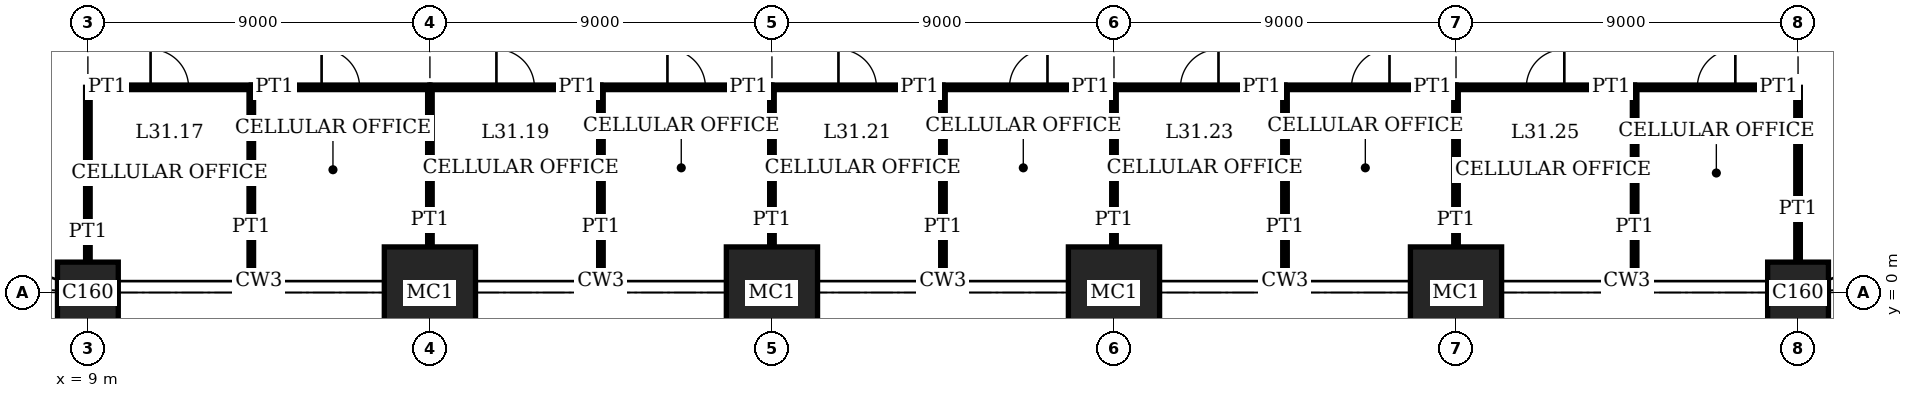
"""IFC4 building model, lengths in metres.
Left out: names, types, materials, properties, quantities, classifications, styles, units other than length and angle.
Written with IfcOpenShell. Run it as: python <this file> out.ifc"""

import sys

from ifc_helpers import new_model, si_unit, direction, frame, frame_2d, origin, origin_2d, place, context, subcontext, project, spatial, rectangle, extrude, element, fill, save


model = new_model("IFC4")
c1 = context("Model", 3, precision=1e-05, world=origin(), true_north=direction((0.0, 1.0)))
c2 = subcontext(c1, "Body", "Model", "MODEL_VIEW")
j1 = project(units=[si_unit("LENGTHUNIT", "METRE"), si_unit("PLANEANGLEUNIT", "RADIAN")], contexts=[c1])
p1 = place(None, origin())
s1 = spatial("IfcSite", under=j1, at=p1, CompositionType="ELEMENT")
p2 = place(p1, origin())
s2 = spatial("IfcBuilding", under=s1, at=p2, CompositionType="ELEMENT")
p3 = place(p2, frame((0.0, 0.0, 129.0)))
s3 = spatial("IfcBuildingStorey", under=s2, at=p3, CompositionType="ELEMENT", Elevation=129.0)
p4 = place(p3, frame((9.0, 0.0, 0.0), z_axis=(0.0, 0.0, 1.0), x_axis=(1.0, 0.0, 0.0)))
e1 = element("IfcColumn", 1, at=p4, inside=s3, PredefinedType="COLUMN", context=c2, shape_type="SweptSolid", body=[
    extrude(rectangle(XDim=1.6, YDim=1.6, at=origin_2d()), origin(), (0.0, 0.0, 1.0), 4.0),
])
for number, where, z_axis, x_axis in (
    (2, (18.0, 0.0, 0.0), (0.0, 0.0, 1.0), (1.0, 0.0, 0.0)),
    (3, (27.0, 0.0, 0.0), (0.0, 0.0, 1.0), (1.0, 0.0, 0.0)),
    (4, (36.0, 0.0, 0.0), (0.0, 0.0, 1.0), (1.0, 0.0, 0.0)),
    (5, (45.0, 0.0, 0.0), (0.0, 0.0, 1.0), (1.0, 0.0, 0.0)),
):
    element("IfcColumn", number, at=place(p3, frame(where, z_axis=z_axis, x_axis=x_axis)), inside=s3, PredefinedType="COLUMN", context=c2, shape_type="SweptSolid", body=[
        extrude(rectangle(XDim=2.4, YDim=2.4, at=origin_2d()), origin(), (0.0, 0.0, 1.0), 4.0),
    ])
p5 = place(p3, frame((54.0, 0.0, 0.0), z_axis=(0.0, 0.0, 1.0), x_axis=(1.0, 0.0, 0.0)))
e6 = element("IfcColumn", 6, at=p5, inside=s3, PredefinedType="COLUMN", context=c2, shape_type="SweptSolid", body=[
    extrude(rectangle(XDim=1.6, YDim=1.6, at=origin_2d()), origin(), (0.0, 0.0, 1.0), 4.0),
])
p6 = place(p3, frame((9.0, 5.4, 0.0), z_axis=(0.0, 0.0, 1.0), x_axis=(1.0, 0.0, 0.0)))
e7 = element("IfcWall", 7, at=p6, inside=s3, PredefinedType="PARTITIONING", context=c2, shape_type="SweptSolid", body=[
    extrude(rectangle(XDim=4.3, YDim=0.12, at=frame_2d((2.15, 0.0))), origin(), (0.0, 0.0, 1.0), 3.75),
])
p7 = place(p6, frame((1.65, 0.0, 0.0)))
e8 = element("IfcOpeningElement", 8, at=p7, cuts=e7, PredefinedType="OPENING", context=c2, shape_type="SweptSolid", body=[
    extrude(rectangle(XDim=1.0, YDim=2.4, at=frame_2d((0.5, 1.2))), frame((0.0, 0.07, 0.0), z_axis=(0.0, -1.0, 0.0), x_axis=(1.0, 0.0, 0.0)), (0.0, 0.0, 1.0), 0.14),
])
p8 = place(p3, frame((13.3, 5.4, 0.0), z_axis=(0.0, 0.0, 1.0), x_axis=(1.0, 0.0, 0.0)))
e9 = element("IfcWall", 9, at=p8, inside=s3, PredefinedType="PARTITIONING", context=c2, shape_type="SweptSolid", body=[
    extrude(rectangle(XDim=4.7, YDim=0.12, at=frame_2d((2.35, 0.0))), origin(), (0.0, 0.0, 1.0), 3.75),
])
p9 = place(p8, frame((1.85, 0.0, 0.0)))
e10 = element("IfcOpeningElement", 10, at=p9, cuts=e9, PredefinedType="OPENING", context=c2, shape_type="SweptSolid", body=[
    extrude(rectangle(XDim=1.0, YDim=2.4, at=frame_2d((0.5, 1.2))), frame((0.0, 0.07, 0.0), z_axis=(0.0, -1.0, 0.0), x_axis=(1.0, 0.0, 0.0)), (0.0, 0.0, 1.0), 0.14),
])
p10 = place(p3, frame((18.0, 5.4, 0.0), z_axis=(0.0, 0.0, 1.0), x_axis=(1.0, 0.0, 0.0)))
e11 = element("IfcWall", 11, at=p10, inside=s3, PredefinedType="PARTITIONING", context=c2, shape_type="SweptSolid", body=[
    extrude(rectangle(XDim=4.5, YDim=0.12, at=frame_2d((2.25, 0.0))), origin(), (0.0, 0.0, 1.0), 3.75),
])
p11 = place(p10, frame((1.75, 0.0, 0.0)))
e12 = element("IfcOpeningElement", 12, at=p11, cuts=e11, PredefinedType="OPENING", context=c2, shape_type="SweptSolid", body=[
    extrude(rectangle(XDim=1.0, YDim=2.4, at=frame_2d((0.5, 1.2))), frame((0.0, 0.07, 0.0), z_axis=(0.0, -1.0, 0.0), x_axis=(1.0, 0.0, 0.0)), (0.0, 0.0, 1.0), 0.14),
])
p12 = place(p3, frame((22.5, 5.4, 0.0), z_axis=(0.0, 0.0, 1.0), x_axis=(1.0, 0.0, 0.0)))
e13 = element("IfcWall", 13, at=p12, inside=s3, PredefinedType="PARTITIONING", context=c2, shape_type="SweptSolid", body=[
    extrude(rectangle(XDim=4.5, YDim=0.12, at=frame_2d((2.25, 0.0))), origin(), (0.0, 0.0, 1.0), 3.75),
])
p13 = place(p12, frame((1.75, 0.0, 0.0)))
e14 = element("IfcOpeningElement", 14, at=p13, cuts=e13, PredefinedType="OPENING", context=c2, shape_type="SweptSolid", body=[
    extrude(rectangle(XDim=1.0, YDim=2.4, at=frame_2d((0.5, 1.2))), frame((0.0, 0.07, 0.0), z_axis=(0.0, -1.0, 0.0), x_axis=(1.0, 0.0, 0.0)), (0.0, 0.0, 1.0), 0.14),
])
p14 = place(p3, frame((27.0, 5.4, 0.0), z_axis=(0.0, 0.0, 1.0), x_axis=(1.0, 0.0, 0.0)))
e15 = element("IfcWall", 15, at=p14, inside=s3, PredefinedType="PARTITIONING", context=c2, shape_type="SweptSolid", body=[
    extrude(rectangle(XDim=4.5, YDim=0.12, at=frame_2d((2.25, 0.0))), origin(), (0.0, 0.0, 1.0), 3.75),
])
p15 = place(p14, frame((1.75, 0.0, 0.0)))
e16 = element("IfcOpeningElement", 16, at=p15, cuts=e15, PredefinedType="OPENING", context=c2, shape_type="SweptSolid", body=[
    extrude(rectangle(XDim=1.0, YDim=2.4, at=frame_2d((0.5, 1.2))), frame((0.0, 0.07, 0.0), z_axis=(0.0, -1.0, 0.0), x_axis=(1.0, 0.0, 0.0)), (0.0, 0.0, 1.0), 0.14),
])
p16 = place(p3, frame((31.5, 5.4, 0.0), z_axis=(0.0, 0.0, 1.0), x_axis=(1.0, 0.0, 0.0)))
e17 = element("IfcWall", 17, at=p16, inside=s3, PredefinedType="PARTITIONING", context=c2, shape_type="SweptSolid", body=[
    extrude(rectangle(XDim=4.5, YDim=0.12, at=frame_2d((2.25, 0.0))), origin(), (0.0, 0.0, 1.0), 3.75),
])
p17 = place(p16, frame((1.75, 0.0, 0.0)))
e18 = element("IfcOpeningElement", 18, at=p17, cuts=e17, PredefinedType="OPENING", context=c2, shape_type="SweptSolid", body=[
    extrude(rectangle(XDim=1.0, YDim=2.4, at=frame_2d((0.5, 1.2))), frame((0.0, 0.07, 0.0), z_axis=(0.0, -1.0, 0.0), x_axis=(1.0, 0.0, 0.0)), (0.0, 0.0, 1.0), 0.14),
])
p18 = place(p3, frame((36.0, 5.4, 0.0), z_axis=(0.0, 0.0, 1.0), x_axis=(1.0, 0.0, 0.0)))
e19 = element("IfcWall", 19, at=p18, inside=s3, PredefinedType="PARTITIONING", context=c2, shape_type="SweptSolid", body=[
    extrude(rectangle(XDim=4.5, YDim=0.12, at=frame_2d((2.25, 0.0))), origin(), (0.0, 0.0, 1.0), 3.75),
])
p19 = place(p18, frame((1.75, 0.0, 0.0)))
e20 = element("IfcOpeningElement", 20, at=p19, cuts=e19, PredefinedType="OPENING", context=c2, shape_type="SweptSolid", body=[
    extrude(rectangle(XDim=1.0, YDim=2.4, at=frame_2d((0.5, 1.2))), frame((0.0, 0.07, 0.0), z_axis=(0.0, -1.0, 0.0), x_axis=(1.0, 0.0, 0.0)), (0.0, 0.0, 1.0), 0.14),
])
p20 = place(p3, frame((40.5, 5.4, 0.0), z_axis=(0.0, 0.0, 1.0), x_axis=(1.0, 0.0, 0.0)))
e21 = element("IfcWall", 21, at=p20, inside=s3, PredefinedType="PARTITIONING", context=c2, shape_type="SweptSolid", body=[
    extrude(rectangle(XDim=4.5, YDim=0.12, at=frame_2d((2.25, 0.0))), origin(), (0.0, 0.0, 1.0), 3.75),
])
p21 = place(p20, frame((1.75, 0.0, 0.0)))
e22 = element("IfcOpeningElement", 22, at=p21, cuts=e21, PredefinedType="OPENING", context=c2, shape_type="SweptSolid", body=[
    extrude(rectangle(XDim=1.0, YDim=2.4, at=frame_2d((0.5, 1.2))), frame((0.0, 0.07, 0.0), z_axis=(0.0, -1.0, 0.0), x_axis=(1.0, 0.0, 0.0)), (0.0, 0.0, 1.0), 0.14),
])
p22 = place(p3, frame((45.0, 5.4, 0.0), z_axis=(0.0, 0.0, 1.0), x_axis=(1.0, 0.0, 0.0)))
e23 = element("IfcWall", 23, at=p22, inside=s3, PredefinedType="PARTITIONING", context=c2, shape_type="SweptSolid", body=[
    extrude(rectangle(XDim=4.7, YDim=0.12, at=frame_2d((2.35, 0.0))), origin(), (0.0, 0.0, 1.0), 3.75),
])
p23 = place(p22, frame((1.85, 0.0, 0.0)))
e24 = element("IfcOpeningElement", 24, at=p23, cuts=e23, PredefinedType="OPENING", context=c2, shape_type="SweptSolid", body=[
    extrude(rectangle(XDim=1.0, YDim=2.4, at=frame_2d((0.5, 1.2))), frame((0.0, 0.07, 0.0), z_axis=(0.0, -1.0, 0.0), x_axis=(1.0, 0.0, 0.0)), (0.0, 0.0, 1.0), 0.14),
])
p24 = place(p3, frame((49.7, 5.4, 0.0), z_axis=(0.0, 0.0, 1.0), x_axis=(1.0, 0.0, 0.0)))
e25 = element("IfcWall", 25, at=p24, inside=s3, PredefinedType="PARTITIONING", context=c2, shape_type="SweptSolid", body=[
    extrude(rectangle(XDim=4.3, YDim=0.12, at=frame_2d((2.15, 0.0))), origin(), (0.0, 0.0, 1.0), 3.75),
])
p25 = place(p24, frame((1.65, 0.0, 0.0)))
e26 = element("IfcOpeningElement", 26, at=p25, cuts=e25, PredefinedType="OPENING", context=c2, shape_type="SweptSolid", body=[
    extrude(rectangle(XDim=1.0, YDim=2.4, at=frame_2d((0.5, 1.2))), frame((0.0, 0.07, 0.0), z_axis=(0.0, -1.0, 0.0), x_axis=(1.0, 0.0, 0.0)), (0.0, 0.0, 1.0), 0.14),
])
p26 = place(p3, frame((9.0, 0.8, 0.0), z_axis=(0.0, 0.0, 1.0), x_axis=(0.0, 1.0, 0.0)))
e27 = element("IfcWall", 27, at=p26, inside=s3, PredefinedType="PARTITIONING", context=c2, shape_type="SweptSolid", body=[
    extrude(rectangle(XDim=4.6, YDim=0.12, at=frame_2d((2.3, 0.0))), origin(), (0.0, 0.0, 1.0), 3.05),
])
p27 = place(p3, frame((13.3, 0.31, 0.0), z_axis=(0.0, 0.0, 1.0), x_axis=(0.0, 1.0, 0.0)))
e28 = element("IfcWall", 28, at=p27, inside=s3, PredefinedType="PARTITIONING", context=c2, shape_type="SweptSolid", body=[
    extrude(rectangle(XDim=5.09, YDim=0.12, at=frame_2d((2.545, 0.0))), origin(), (0.0, 0.0, 1.0), 3.75),
])
p28 = place(p3, frame((18.0, 1.2, 0.0), z_axis=(0.0, 0.0, 1.0), x_axis=(0.0, 1.0, 0.0)))
e29 = element("IfcWall", 29, at=p28, inside=s3, PredefinedType="PARTITIONING", context=c2, shape_type="SweptSolid", body=[
    extrude(rectangle(XDim=4.2, YDim=0.12, at=frame_2d((2.1, 0.0))), origin(), (0.0, 0.0, 1.0), 3.05),
])
p29 = place(p3, frame((22.5, 0.31, 0.0), z_axis=(0.0, 0.0, 1.0), x_axis=(0.0, 1.0, 0.0)))
e30 = element("IfcWall", 30, at=p29, inside=s3, PredefinedType="PARTITIONING", context=c2, shape_type="SweptSolid", body=[
    extrude(rectangle(XDim=5.09, YDim=0.12, at=frame_2d((2.545, 0.0))), origin(), (0.0, 0.0, 1.0), 3.75),
])
p30 = place(p3, frame((27.0, 1.2, 0.0), z_axis=(0.0, 0.0, 1.0), x_axis=(0.0, 1.0, 0.0)))
e31 = element("IfcWall", 31, at=p30, inside=s3, PredefinedType="PARTITIONING", context=c2, shape_type="SweptSolid", body=[
    extrude(rectangle(XDim=4.2, YDim=0.12, at=frame_2d((2.1, 0.0))), origin(), (0.0, 0.0, 1.0), 3.05),
])
p31 = place(p3, frame((31.5, 0.31, 0.0), z_axis=(0.0, 0.0, 1.0), x_axis=(0.0, 1.0, 0.0)))
e32 = element("IfcWall", 32, at=p31, inside=s3, PredefinedType="PARTITIONING", context=c2, shape_type="SweptSolid", body=[
    extrude(rectangle(XDim=5.09, YDim=0.12, at=frame_2d((2.545, 0.0))), origin(), (0.0, 0.0, 1.0), 3.75),
])
p32 = place(p3, frame((36.0, 1.2, 0.0), z_axis=(0.0, 0.0, 1.0), x_axis=(0.0, 1.0, 0.0)))
e33 = element("IfcWall", 33, at=p32, inside=s3, PredefinedType="PARTITIONING", context=c2, shape_type="SweptSolid", body=[
    extrude(rectangle(XDim=4.2, YDim=0.12, at=frame_2d((2.1, 0.0))), origin(), (0.0, 0.0, 1.0), 3.05),
])
p33 = place(p3, frame((40.5, 0.31, 0.0), z_axis=(0.0, 0.0, 1.0), x_axis=(0.0, 1.0, 0.0)))
e34 = element("IfcWall", 34, at=p33, inside=s3, PredefinedType="PARTITIONING", context=c2, shape_type="SweptSolid", body=[
    extrude(rectangle(XDim=5.09, YDim=0.12, at=frame_2d((2.545, 0.0))), origin(), (0.0, 0.0, 1.0), 3.75),
])
p34 = place(p3, frame((45.0, 1.2, 0.0), z_axis=(0.0, 0.0, 1.0), x_axis=(0.0, 1.0, 0.0)))
e35 = element("IfcWall", 35, at=p34, inside=s3, PredefinedType="PARTITIONING", context=c2, shape_type="SweptSolid", body=[
    extrude(rectangle(XDim=4.2, YDim=0.12, at=frame_2d((2.1, 0.0))), origin(), (0.0, 0.0, 1.0), 3.05),
])
p35 = place(p3, frame((49.7, 0.31, 0.0), z_axis=(0.0, 0.0, 1.0), x_axis=(0.0, 1.0, 0.0)))
e36 = element("IfcWall", 36, at=p35, inside=s3, PredefinedType="PARTITIONING", context=c2, shape_type="SweptSolid", body=[
    extrude(rectangle(XDim=5.09, YDim=0.12, at=frame_2d((2.545, 0.0))), origin(), (0.0, 0.0, 1.0), 3.75),
])
p36 = place(p3, frame((54.0, 0.8, 0.0), z_axis=(0.0, 0.0, 1.0), x_axis=(0.0, 1.0, 0.0)))
e37 = element("IfcWall", 37, at=p36, inside=s3, PredefinedType="PARTITIONING", context=c2, shape_type="SweptSolid", body=[
    extrude(rectangle(XDim=4.6, YDim=0.12, at=frame_2d((2.3, 0.0))), origin(), (0.0, 0.0, 1.0), 3.05),
])
p37 = place(p7, origin())
e38 = element("IfcDoor", 38, at=p37, inside=s3, OperationType="SINGLE_SWING_RIGHT", PredefinedType="DOOR", context=c2, shape_type="SweptSolid", body=[
    extrude(rectangle(XDim=1.0, YDim=2.4, at=frame_2d((0.5, 1.2))), frame((0.0, 0.025, 0.0), z_axis=(0.0, -1.0, 0.0), x_axis=(1.0, 0.0, 0.0)), (0.0, 0.0, 1.0), 0.05),
])
fill(e8, e38)
p38 = place(p9, origin())
e39 = element("IfcDoor", 39, at=p38, inside=s3, OperationType="SINGLE_SWING_RIGHT", PredefinedType="DOOR", context=c2, shape_type="SweptSolid", body=[
    extrude(rectangle(XDim=1.0, YDim=2.4, at=frame_2d((0.5, 1.2))), frame((0.0, 0.025, 0.0), z_axis=(0.0, -1.0, 0.0), x_axis=(1.0, 0.0, 0.0)), (0.0, 0.0, 1.0), 0.05),
])
fill(e10, e39)
p39 = place(p11, origin())
e40 = element("IfcDoor", 40, at=p39, inside=s3, OperationType="SINGLE_SWING_RIGHT", PredefinedType="DOOR", context=c2, shape_type="SweptSolid", body=[
    extrude(rectangle(XDim=1.0, YDim=2.4, at=frame_2d((0.5, 1.2))), frame((0.0, 0.025, 0.0), z_axis=(0.0, -1.0, 0.0), x_axis=(1.0, 0.0, 0.0)), (0.0, 0.0, 1.0), 0.05),
])
fill(e12, e40)
p40 = place(p13, origin())
e41 = element("IfcDoor", 41, at=p40, inside=s3, OperationType="SINGLE_SWING_RIGHT", PredefinedType="DOOR", context=c2, shape_type="SweptSolid", body=[
    extrude(rectangle(XDim=1.0, YDim=2.4, at=frame_2d((0.5, 1.2))), frame((0.0, 0.025, 0.0), z_axis=(0.0, -1.0, 0.0), x_axis=(1.0, 0.0, 0.0)), (0.0, 0.0, 1.0), 0.05),
])
fill(e14, e41)
p41 = place(p15, origin())
e42 = element("IfcDoor", 42, at=p41, inside=s3, OperationType="SINGLE_SWING_RIGHT", PredefinedType="DOOR", context=c2, shape_type="SweptSolid", body=[
    extrude(rectangle(XDim=1.0, YDim=2.4, at=frame_2d((0.5, 1.2))), frame((0.0, 0.025, 0.0), z_axis=(0.0, -1.0, 0.0), x_axis=(1.0, 0.0, 0.0)), (0.0, 0.0, 1.0), 0.05),
])
fill(e16, e42)
p42 = place(p17, origin())
e43 = element("IfcDoor", 43, at=p42, inside=s3, OperationType="SINGLE_SWING_LEFT", PredefinedType="DOOR", context=c2, shape_type="SweptSolid", body=[
    extrude(rectangle(XDim=1.0, YDim=2.4, at=frame_2d((0.5, 1.2))), frame((0.0, 0.025, 0.0), z_axis=(0.0, -1.0, 0.0), x_axis=(1.0, 0.0, 0.0)), (0.0, 0.0, 1.0), 0.05),
])
fill(e18, e43)
p43 = place(p19, origin())
e44 = element("IfcDoor", 44, at=p43, inside=s3, OperationType="SINGLE_SWING_LEFT", PredefinedType="DOOR", context=c2, shape_type="SweptSolid", body=[
    extrude(rectangle(XDim=1.0, YDim=2.4, at=frame_2d((0.5, 1.2))), frame((0.0, 0.025, 0.0), z_axis=(0.0, -1.0, 0.0), x_axis=(1.0, 0.0, 0.0)), (0.0, 0.0, 1.0), 0.05),
])
fill(e20, e44)
p44 = place(p21, origin())
e45 = element("IfcDoor", 45, at=p44, inside=s3, OperationType="SINGLE_SWING_LEFT", PredefinedType="DOOR", context=c2, shape_type="SweptSolid", body=[
    extrude(rectangle(XDim=1.0, YDim=2.4, at=frame_2d((0.5, 1.2))), frame((0.0, 0.025, 0.0), z_axis=(0.0, -1.0, 0.0), x_axis=(1.0, 0.0, 0.0)), (0.0, 0.0, 1.0), 0.05),
])
fill(e22, e45)
p45 = place(p23, origin())
e46 = element("IfcDoor", 46, at=p45, inside=s3, OperationType="SINGLE_SWING_LEFT", PredefinedType="DOOR", context=c2, shape_type="SweptSolid", body=[
    extrude(rectangle(XDim=1.0, YDim=2.4, at=frame_2d((0.5, 1.2))), frame((0.0, 0.025, 0.0), z_axis=(0.0, -1.0, 0.0), x_axis=(1.0, 0.0, 0.0)), (0.0, 0.0, 1.0), 0.05),
])
fill(e24, e46)
p46 = place(p25, origin())
e47 = element("IfcDoor", 47, at=p46, inside=s3, OperationType="SINGLE_SWING_LEFT", PredefinedType="DOOR", context=c2, shape_type="SweptSolid", body=[
    extrude(rectangle(XDim=1.0, YDim=2.4, at=frame_2d((0.5, 1.2))), frame((0.0, 0.025, 0.0), z_axis=(0.0, -1.0, 0.0), x_axis=(1.0, 0.0, 0.0)), (0.0, 0.0, 1.0), 0.05),
])
fill(e26, e47)
save(model, sys.argv[1])
